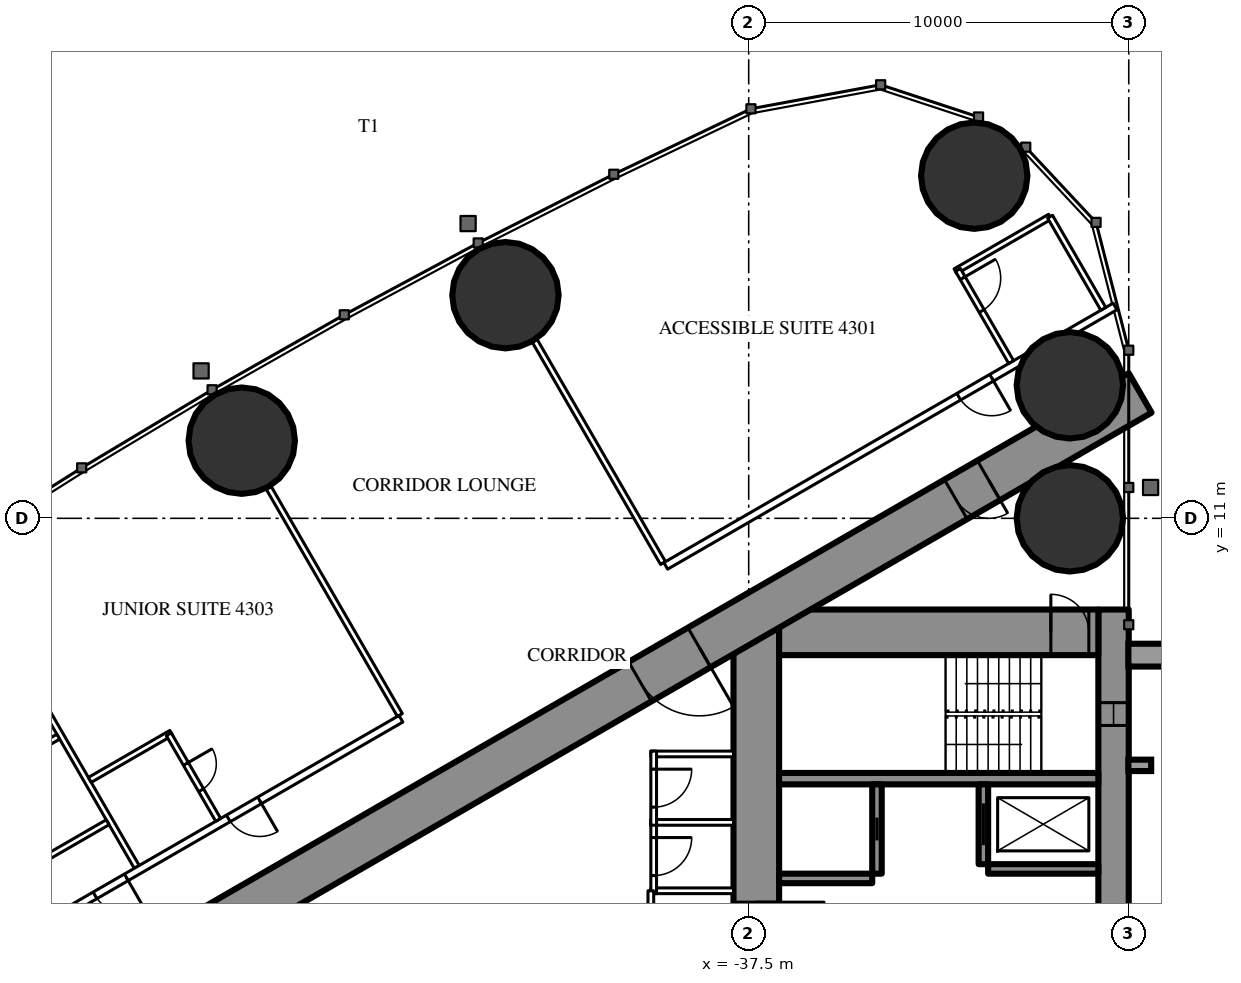
"""IFC4 building model, lengths in metres.
Left out: names, types, materials, properties, quantities, classifications, styles, units other than length and angle.
Written with IfcOpenShell. Run it as: python <this file> out.ifc"""

import sys

from ifc_helpers import new_model, si_unit, direction, frame, frame_2d, origin, origin_2d, place, context, subcontext, project, spatial, rectangle, circle, extrude, element, fill, save


model = new_model("IFC4")
c1 = context("Model", 3, precision=1e-05, world=origin(), true_north=direction((0.0, 1.0)))
c2 = subcontext(c1, "Body", "Model", "MODEL_VIEW")
j1 = project(units=[si_unit("LENGTHUNIT", "METRE"), si_unit("PLANEANGLEUNIT", "RADIAN")], contexts=[c1])
p1 = place(None, origin())
s1 = spatial("IfcSite", under=j1, at=p1, CompositionType="ELEMENT")
p2 = place(p1, origin())
s2 = spatial("IfcBuilding", under=s1, at=p2, CompositionType="ELEMENT")
p3 = place(p2, frame((0.0, 0.0, 163.3)))
s3 = spatial("IfcBuildingStorey", under=s2, at=p3, CompositionType="ELEMENT", Elevation=163.3)
for number, where, z_axis, x_axis in (
    (1, (-31.565, 20.016, 0.0), (0.0, 0.0, 1.0), (1.0, 0.0, 0.0)),
    (2, (-29.05, 11.0, 0.0), (0.0, 0.0, 1.0), (1.0, 0.0, 0.0)),
    (3, (-29.05, 14.5, 0.0), (0.0, 0.0, 1.0), (1.0, 0.0, 0.0)),
    (4, (-43.9, 16.871, 0.0), (0.0, 0.0, 1.0), (1.0, 0.0, 0.0)),
    (5, (-50.839, 13.043, 0.0), (0.0, 0.0, 1.0), (1.0, 0.0, 0.0)),
):
    element("IfcColumn", number, at=place(p3, frame(where, z_axis=z_axis, x_axis=x_axis)), inside=s3, PredefinedType="COLUMN", context=c2, shape_type="SweptSolid", body=[
        extrude(circle(Radius=1.4, at=origin_2d()), origin(), (0.0, 0.0, 1.0), 3.5),
    ])
p4 = place(p3, frame((-27.9, 8.6, 0.0), z_axis=(0.0, 0.0, 1.0), x_axis=(0.0, -1.0, 0.0)))
e6 = element("IfcWall", 6, at=p4, inside=s3, PredefinedType="SHEAR", context=c2, shape_type="SweptSolid", body=[
    extrude(rectangle(XDim=17.2, YDim=0.8, at=frame_2d((8.6, 0.0))), origin(), (0.0, 0.0, 1.0), 3.5),
])
p5 = place(p4, frame((2.45, 0.0, 0.6)))
e7 = element("IfcOpeningElement", 7, at=p5, cuts=e6, PredefinedType="OPENING", context=c2, shape_type="SweptSolid", body=[
    extrude(rectangle(XDim=0.6, YDim=2.1, at=frame_2d((0.3, 1.05))), frame((0.0, 0.41, 0.0), z_axis=(0.0, -1.0, 0.0), x_axis=(1.0, 0.0, 0.0)), (0.0, 0.0, 1.0), 0.82),
])
p6 = place(p4, frame((14.15, 0.0, 0.6)))
e8 = element("IfcOpeningElement", 8, at=p6, cuts=e6, PredefinedType="OPENING", context=c2, shape_type="SweptSolid", body=[
    extrude(rectangle(XDim=0.6, YDim=2.1, at=frame_2d((0.3, 1.05))), frame((0.0, 0.41, 0.0), z_axis=(0.0, -1.0, 0.0), x_axis=(1.0, 0.0, 0.0)), (0.0, 0.0, 1.0), 0.82),
])
p7 = place(p3, frame((-37.3, 8.6, 0.0), z_axis=(0.0, 0.0, 1.0), x_axis=(0.0, -1.0, 0.0)))
e9 = element("IfcWall", 9, at=p7, inside=s3, PredefinedType="SHEAR", context=c2, shape_type="SweptSolid", body=[
    extrude(rectangle(XDim=17.2, YDim=1.2, at=frame_2d((8.6, 0.0))), origin(), (0.0, 0.0, 1.0), 3.5),
])
p8 = place(p7, frame((7.7, 0.0, 0.0)))
e10 = element("IfcOpeningElement", 10, at=p8, cuts=e9, PredefinedType="OPENING", context=c2, shape_type="SweptSolid", body=[
    extrude(rectangle(XDim=1.8, YDim=2.2, at=frame_2d((0.9, 1.1))), frame((0.0, 0.61, 0.0), z_axis=(0.0, -1.0, 0.0), x_axis=(1.0, 0.0, 0.0)), (0.0, 0.0, 1.0), 1.22),
])
p9 = place(p3, frame((-28.3, 8.0, 0.0), z_axis=(0.0, 0.0, 1.0), x_axis=(-1.0, 0.0, 0.0)))
e11 = element("IfcWall", 11, at=p9, inside=s3, PredefinedType="SHEAR", context=c2, shape_type="SweptSolid", body=[
    extrude(rectangle(XDim=8.4, YDim=1.2, at=frame_2d((4.2, 0.0))), origin(), (0.0, 0.0, 1.0), 3.5),
])
p10 = place(p9, frame((0.25, 0.0, 0.0)))
e12 = element("IfcOpeningElement", 12, at=p10, cuts=e11, PredefinedType="OPENING", context=c2, shape_type="SweptSolid", body=[
    extrude(rectangle(XDim=1.0, YDim=2.2, at=frame_2d((0.5, 1.1))), frame((0.0, 0.61, 0.0), z_axis=(0.0, -1.0, 0.0), x_axis=(1.0, 0.0, 0.0)), (0.0, 0.0, 1.0), 1.22),
])
p11 = place(p3, frame((-28.3, 4.15, 0.0), z_axis=(0.0, 0.0, 1.0), x_axis=(-1.0, 0.0, 0.0)))
e13 = element("IfcWall", 13, at=p11, inside=s3, PredefinedType="SHEAR", context=c2, shape_type="SweptSolid", body=[
    extrude(rectangle(XDim=8.4, YDim=0.3, at=frame_2d((4.2, 0.0))), origin(), (0.0, 0.0, 1.0), 3.5),
])
p12 = place(p3, frame((-31.325, 4.0, 0.0), z_axis=(0.0, 0.0, 1.0), x_axis=(0.0, -1.0, 0.0)))
e14 = element("IfcWall", 14, at=p12, inside=s3, PredefinedType="SHEAR", context=c2, shape_type="SweptSolid", body=[
    extrude(rectangle(XDim=2.1, YDim=0.25, at=frame_2d((1.05, 0.0))), origin(), (0.0, 0.0, 1.0), 3.5),
])
p13 = place(p12, frame((0.5, 0.0, 0.0)))
e15 = element("IfcOpeningElement", 15, at=p13, cuts=e14, PredefinedType="OPENING", context=c2, shape_type="SweptSolid", body=[
    extrude(rectangle(XDim=1.1, YDim=2.2, at=frame_2d((0.55, 1.1))), frame((0.0, 0.135, 0.0), z_axis=(0.0, -1.0, 0.0), x_axis=(1.0, 0.0, 0.0)), (0.0, 0.0, 1.0), 0.27),
])
p14 = place(p3, frame((-34.125, 4.0, 0.0), z_axis=(0.0, 0.0, 1.0), x_axis=(0.0, -1.0, 0.0)))
e16 = element("IfcWall", 16, at=p14, inside=s3, PredefinedType="SHEAR", context=c2, shape_type="SweptSolid", body=[
    extrude(rectangle(XDim=2.35, YDim=0.25, at=frame_2d((1.175, 0.0))), origin(), (0.0, 0.0, 1.0), 3.5),
])
p15 = place(p14, frame((0.875, 0.0, 0.0)))
e17 = element("IfcOpeningElement", 17, at=p15, cuts=e16, PredefinedType="OPENING", context=c2, shape_type="SweptSolid", body=[
    extrude(rectangle(XDim=0.6, YDim=2.0, at=frame_2d((0.3, 1.0))), frame((0.0, 0.135, 0.0), z_axis=(0.0, -1.0, 0.0), x_axis=(1.0, 0.0, 0.0)), (0.0, 0.0, 1.0), 0.27),
])
p16 = place(p3, frame((-28.3, 1.775, 0.0), z_axis=(0.0, 0.0, 1.0), x_axis=(-1.0, 0.0, 0.0)))
e18 = element("IfcWall", 18, at=p16, inside=s3, PredefinedType="SHEAR", context=c2, shape_type="SweptSolid", body=[
    extrude(rectangle(XDim=2.9, YDim=0.25, at=frame_2d((1.45, 0.0))), origin(), (0.0, 0.0, 1.0), 3.5),
])
p17 = place(p3, frame((-34.25, 1.525, 0.0), z_axis=(0.0, 0.0, 1.0), x_axis=(-1.0, 0.0, 0.0)))
e19 = element("IfcWall", 19, at=p17, inside=s3, PredefinedType="SHEAR", context=c2, shape_type="SweptSolid", body=[
    extrude(rectangle(XDim=2.45, YDim=0.25, at=frame_2d((1.225, 0.0))), origin(), (0.0, 0.0, 1.0), 3.5),
])
p18 = place(p3, frame((-27.2, 14.3, 0.0), z_axis=(0.0, 0.0, 1.0), x_axis=(-0.866026593062, -0.499997940104, 0.0)))
e20 = element("IfcWall", 20, at=p18, inside=s3, PredefinedType="SHEAR", context=c2, shape_type="SweptSolid", body=[
    extrude(rectangle(XDim=28.946, YDim=1.2, at=frame_2d((14.473, 0.0))), origin(), (0.0, 0.0, 1.0), 3.5),
])
p19 = place(p18, frame((4.6, 0.0, 0.0)))
e21 = element("IfcOpeningElement", 21, at=p19, cuts=e20, PredefinedType="OPENING", context=c2, shape_type="SweptSolid", body=[
    extrude(rectangle(XDim=1.0, YDim=2.2, at=frame_2d((0.5, 1.1))), frame((0.0, 0.61, 0.0), z_axis=(0.0, -1.0, 0.0), x_axis=(1.0, 0.0, 0.0)), (0.0, 0.0, 1.0), 1.22),
])
p20 = place(p18, frame((13.395, 0.0, 0.0)))
e22 = element("IfcOpeningElement", 22, at=p20, cuts=e20, PredefinedType="OPENING", context=c2, shape_type="SweptSolid", body=[
    extrude(rectangle(XDim=1.8, YDim=2.2, at=frame_2d((0.9, 1.1))), frame((0.0, 0.61, 0.0), z_axis=(0.0, -1.0, 0.0), x_axis=(1.0, 0.0, 0.0)), (0.0, 0.0, 1.0), 1.22),
])
p21 = place(p3, frame((-39.754, 9.823, 0.0), z_axis=(0.0, 0.0, 1.0), x_axis=(-0.499997670926, 0.866026748472, 0.0)))
e23 = element("IfcWall", 23, at=p21, inside=s3, PredefinedType="PARTITIONING", context=c2, shape_type="SweptSolid", body=[
    extrude(rectangle(XDim=6.757, YDim=0.15, at=frame_2d((3.379, 0.0))), origin(), (0.0, 0.0, 1.0), 2.3),
])
p22 = place(p3, frame((-46.679, 5.825, 0.0), z_axis=(0.0, 0.0, 1.0), x_axis=(-0.500006839597, 0.866021454905, 0.0)))
e24 = element("IfcWall", 24, at=p22, inside=s3, PredefinedType="PARTITIONING", context=c2, shape_type="SweptSolid", body=[
    extrude(rectangle(XDim=6.911, YDim=0.15, at=frame_2d((3.456, 0.0))), origin(), (0.0, 0.0, 1.0), 2.3),
])
p23 = place(p3, frame((-53.602, 1.828, 0.0), z_axis=(0.0, 0.0, 1.0), x_axis=(-0.49999191814, 0.866030069798, 0.0)))
e25 = element("IfcWall", 25, at=p23, inside=s3, PredefinedType="PARTITIONING", context=c2, shape_type="SweptSolid", body=[
    extrude(rectangle(XDim=6.692, YDim=0.15, at=frame_2d((3.346, 0.0))), origin(), (0.0, 0.0, 1.0), 2.3),
])
p24 = place(p3, frame((-27.86, 16.575, 0.0), z_axis=(0.0, 0.0, 1.0), x_axis=(-0.866026850238, -0.499997494661, 0.0)))
e26 = element("IfcWall", 26, at=p24, inside=s3, PredefinedType="PARTITIONING", context=c2, shape_type="SweptSolid", body=[
    extrude(rectangle(XDim=13.651, YDim=0.2, at=frame_2d((6.826, 0.0))), origin(), (0.0, 0.0, 1.0), 3.25),
])
p25 = place(p24, frame((3.75, 0.0, 0.0)))
e27 = element("IfcOpeningElement", 27, at=p25, cuts=e26, PredefinedType="OPENING", context=c2, shape_type="SweptSolid", body=[
    extrude(rectangle(XDim=1.0, YDim=2.2, at=frame_2d((0.5, 1.1))), frame((0.0, 0.11, 0.0), z_axis=(0.0, -1.0, 0.0), x_axis=(1.0, 0.0, 0.0)), (0.0, 0.0, 1.0), 0.22),
])
p26 = place(p3, frame((-46.65, 5.726, 0.0), z_axis=(0.0, 0.0, 1.0), x_axis=(-0.866027963864, -0.499995565786, 0.0)))
e28 = element("IfcWall", 28, at=p26, inside=s3, PredefinedType="PARTITIONING", context=c2, shape_type="SweptSolid", body=[
    extrude(rectangle(XDim=11.452, YDim=0.2, at=frame_2d((5.726, 0.0))), origin(), (0.0, 0.0, 1.0), 3.25),
])
p27 = place(p26, frame((4.294, 0.0, 0.0)))
e29 = element("IfcOpeningElement", 29, at=p27, cuts=e28, PredefinedType="OPENING", context=c2, shape_type="SweptSolid", body=[
    extrude(rectangle(XDim=0.95, YDim=2.2, at=frame_2d((0.475, 1.1))), frame((0.0, 0.11, 0.0), z_axis=(0.0, -1.0, 0.0), x_axis=(1.0, 0.0, 0.0)), (0.0, 0.0, 1.0), 0.22),
])
p28 = place(p26, frame((8.344, 0.0, 0.0)))
e30 = element("IfcOpeningElement", 30, at=p28, cuts=e28, PredefinedType="OPENING", context=c2, shape_type="SweptSolid", body=[
    extrude(rectangle(XDim=0.95, YDim=2.2, at=frame_2d((0.475, 1.1))), frame((0.0, 0.11, 0.0), z_axis=(0.0, -1.0, 0.0), x_axis=(1.0, 0.0, 0.0)), (0.0, 0.0, 1.0), 0.22),
])
p29 = place(p3, frame((-29.57, 18.936, 0.0), z_axis=(0.0, 0.0, 1.0), x_axis=(-0.866018712932, -0.500011588718, 0.0)))
e31 = element("IfcWall", 31, at=p29, inside=s3, PredefinedType="PARTITIONING", context=c2, shape_type="SweptSolid", body=[
    extrude(rectangle(XDim=2.875, YDim=0.15, at=frame_2d((1.438, 0.0))), origin(), (0.0, 0.0, 1.0), 3.25),
])
p30 = place(p3, frame((-30.595, 15.111, 0.0), z_axis=(0.0, 0.0, 1.0), x_axis=(-0.49998411664, 0.866034573852, 0.0)))
e32 = element("IfcWall", 32, at=p30, inside=s3, PredefinedType="PARTITIONING", context=c2, shape_type="SweptSolid", body=[
    extrude(rectangle(XDim=2.8, YDim=0.15, at=frame_2d((1.4, 0.0))), origin(), (0.0, 0.0, 1.0), 3.25),
])
p31 = place(p30, frame((1.55, 0.0, 0.0)))
e33 = element("IfcOpeningElement", 33, at=p31, cuts=e32, PredefinedType="OPENING", context=c2, shape_type="SweptSolid", body=[
    extrude(rectangle(XDim=1.0, YDim=2.2, at=frame_2d((0.5, 1.1))), frame((0.0, 0.085, 0.0), z_axis=(0.0, -1.0, 0.0), x_axis=(1.0, 0.0, 0.0)), (0.0, 0.0, 1.0), 0.17),
])
p32 = place(p3, frame((-28.17, 16.511, 0.0), z_axis=(0.0, 0.0, 1.0), x_axis=(-0.49994636267, 0.866056369097, 0.0)))
e34 = element("IfcWall", 34, at=p32, inside=s3, PredefinedType="PARTITIONING", context=c2, shape_type="SweptSolid", body=[
    extrude(rectangle(XDim=2.8, YDim=0.15, at=frame_2d((1.4, 0.0))), origin(), (0.0, 0.0, 1.0), 3.25),
])
p33 = place(p3, frame((-52.694, 5.355, 0.0), z_axis=(0.0, 0.0, 1.0), x_axis=(-0.866031185235, -0.4999899861, 0.0)))
e35 = element("IfcWall", 35, at=p33, inside=s3, PredefinedType="PARTITIONING", context=c2, shape_type="SweptSolid", body=[
    extrude(rectangle(XDim=2.475, YDim=0.15, at=frame_2d((1.238, 0.0))), origin(), (0.0, 0.0, 1.0), 3.25),
])
p34 = place(p3, frame((-51.459, 3.065, 0.0), z_axis=(0.0, 0.0, 1.0), x_axis=(-0.499936506574, 0.866062058628, 0.0)))
e36 = element("IfcWall", 36, at=p34, inside=s3, PredefinedType="PARTITIONING", context=c2, shape_type="SweptSolid", body=[
    extrude(rectangle(XDim=2.6, YDim=0.15, at=frame_2d((1.3, 0.0))), origin(), (0.0, 0.0, 1.0), 3.25),
])
p35 = place(p34, frame((0.9, 0.0, 0.0)))
e37 = element("IfcOpeningElement", 37, at=p35, cuts=e36, PredefinedType="OPENING", context=c2, shape_type="SweptSolid", body=[
    extrude(rectangle(XDim=0.8, YDim=2.2, at=frame_2d((0.4, 1.1))), frame((0.0, 0.085, 0.0), z_axis=(0.0, -1.0, 0.0), x_axis=(1.0, 0.0, 0.0)), (0.0, 0.0, 1.0), 0.17),
])
p36 = place(p3, frame((-55.667, 5.255, 0.0), z_axis=(0.0, 0.0, 1.0), x_axis=(-0.866006523861, -0.500032699561, 0.0)))
e38 = element("IfcWall", 38, at=p36, inside=s3, PredefinedType="PARTITIONING", context=c2, shape_type="SweptSolid", body=[
    extrude(rectangle(XDim=2.475, YDim=0.15, at=frame_2d((1.237, 0.0))), origin(), (0.0, 0.0, 1.0), 3.25),
])
p37 = place(p3, frame((-54.367, 3.003, 0.0), z_axis=(0.0, 0.0, 1.0), x_axis=(-0.866031185235, -0.4999899861, 0.0)))
e39 = element("IfcWall", 39, at=p37, inside=s3, PredefinedType="PARTITIONING", context=c2, shape_type="SweptSolid", body=[
    extrude(rectangle(XDim=2.475, YDim=0.15, at=frame_2d((1.238, 0.0))), origin(), (0.0, 0.0, 1.0), 3.25),
])
for number, where, z_axis, x_axis in (
    (40, (-37.9, 1.2, 0.0), (0.0, 0.0, 1.0), (-1.0, 0.0, 0.0)),
    (41, (-37.9, 3.0, 0.0), (0.0, 0.0, 1.0), (-1.0, 0.0, 0.0)),
    (42, (-37.9, 4.8, 0.0), (0.0, 0.0, 1.0), (-1.0, 0.0, 0.0)),
):
    element("IfcWall", number, at=place(p3, frame(where, z_axis=z_axis, x_axis=x_axis)), inside=s3, PredefinedType="PARTITIONING", context=c2, shape_type="SweptSolid", body=[
        extrude(rectangle(XDim=2.175, YDim=0.15, at=frame_2d((1.087, 0.0))), origin(), (0.0, 0.0, 1.0), 3.25),
    ])
p38 = place(p3, frame((-40.0, 3.075, 0.0), z_axis=(0.0, 0.0, 1.0), x_axis=(0.0, -1.0, 0.0)))
e43 = element("IfcWall", 43, at=p38, inside=s3, PredefinedType="PARTITIONING", context=c2, shape_type="SweptSolid", body=[
    extrude(rectangle(XDim=1.95, YDim=0.15, at=frame_2d((0.975, 0.0))), origin(), (0.0, 0.0, 1.0), 3.25),
])
p39 = place(p38, frame((0.475, 0.0, 0.0)))
e44 = element("IfcOpeningElement", 44, at=p39, cuts=e43, PredefinedType="OPENING", context=c2, shape_type="SweptSolid", body=[
    extrude(rectangle(XDim=1.0, YDim=2.2, at=frame_2d((0.5, 1.1))), frame((0.0, 0.085, 0.0), z_axis=(0.0, -1.0, 0.0), x_axis=(1.0, 0.0, 0.0)), (0.0, 0.0, 1.0), 0.17),
])
p40 = place(p3, frame((-40.0, 4.875, 0.0), z_axis=(0.0, 0.0, 1.0), x_axis=(0.0, -1.0, 0.0)))
e45 = element("IfcWall", 45, at=p40, inside=s3, PredefinedType="PARTITIONING", context=c2, shape_type="SweptSolid", body=[
    extrude(rectangle(XDim=1.95, YDim=0.15, at=frame_2d((0.975, 0.0))), origin(), (0.0, 0.0, 1.0), 3.25),
])
p41 = place(p40, frame((0.475, 0.0, 0.0)))
e46 = element("IfcOpeningElement", 46, at=p41, cuts=e45, PredefinedType="OPENING", context=c2, shape_type="SweptSolid", body=[
    extrude(rectangle(XDim=1.0, YDim=2.2, at=frame_2d((0.5, 1.1))), frame((0.0, 0.085, 0.0), z_axis=(0.0, -1.0, 0.0), x_axis=(1.0, 0.0, 0.0)), (0.0, 0.0, 1.0), 0.17),
])
p42 = place(p3, frame((-40.075, 1.2, 0.0), z_axis=(0.0, 0.0, 1.0), x_axis=(0.0, -1.0, 0.0)))
e47 = element("IfcWall", 47, at=p42, inside=s3, PredefinedType="PARTITIONING", context=c2, shape_type="SweptSolid", body=[
    extrude(rectangle(XDim=7.374, YDim=0.15, at=frame_2d((3.687, 0.0))), origin(), (0.0, 0.0, 1.0), 3.25),
])
p43 = place(p42, frame((2.787, 0.0, 0.0)))
e48 = element("IfcOpeningElement", 48, at=p43, cuts=e47, PredefinedType="OPENING", context=c2, shape_type="SweptSolid", body=[
    extrude(rectangle(XDim=1.8, YDim=2.2, at=frame_2d((0.9, 1.1))), frame((0.0, 0.085, 0.0), z_axis=(0.0, -1.0, 0.0), x_axis=(1.0, 0.0, 0.0)), (0.0, 0.0, 1.0), 0.17),
])
p44 = place(p31, origin())
e49 = element("IfcDoor", 49, at=p44, inside=s3, OperationType="SINGLE_SWING_RIGHT", PredefinedType="DOOR", context=c2, shape_type="SweptSolid", body=[
    extrude(rectangle(XDim=1.0, YDim=2.2, at=frame_2d((0.5, 1.1))), frame((0.0, 0.025, 0.0), z_axis=(0.0, -1.0, 0.0), x_axis=(1.0, 0.0, 0.0)), (0.0, 0.0, 1.0), 0.05),
])
fill(e33, e49)
p45 = place(p25, origin())
e50 = element("IfcDoor", 50, at=p45, inside=s3, OperationType="SINGLE_SWING_LEFT", PredefinedType="DOOR", context=c2, shape_type="SweptSolid", body=[
    extrude(rectangle(XDim=1.0, YDim=2.2, at=frame_2d((0.5, 1.1))), frame((0.0, 0.025, 0.0), z_axis=(0.0, -1.0, 0.0), x_axis=(1.0, 0.0, 0.0)), (0.0, 0.0, 1.0), 0.05),
])
fill(e27, e50)
p46 = place(p35, origin())
e51 = element("IfcDoor", 51, at=p46, inside=s3, OperationType="SINGLE_SWING_RIGHT", PredefinedType="DOOR", context=c2, shape_type="SweptSolid", body=[
    extrude(rectangle(XDim=0.8, YDim=2.2, at=frame_2d((0.4, 1.1))), frame((0.0, 0.025, 0.0), z_axis=(0.0, -1.0, 0.0), x_axis=(1.0, 0.0, 0.0)), (0.0, 0.0, 1.0), 0.05),
])
fill(e37, e51)
p47 = place(p27, origin())
e52 = element("IfcDoor", 52, at=p47, inside=s3, OperationType="SINGLE_SWING_LEFT", PredefinedType="DOOR", context=c2, shape_type="SweptSolid", body=[
    extrude(rectangle(XDim=0.95, YDim=2.2, at=frame_2d((0.475, 1.1))), frame((0.0, 0.025, 0.0), z_axis=(0.0, -1.0, 0.0), x_axis=(1.0, 0.0, 0.0)), (0.0, 0.0, 1.0), 0.05),
])
fill(e29, e52)
p48 = place(p28, origin())
e53 = element("IfcDoor", 53, at=p48, inside=s3, OperationType="SINGLE_SWING_LEFT", PredefinedType="DOOR", context=c2, shape_type="SweptSolid", body=[
    extrude(rectangle(XDim=0.95, YDim=2.2, at=frame_2d((0.475, 1.1))), frame((0.0, 0.025, 0.0), z_axis=(0.0, -1.0, 0.0), x_axis=(1.0, 0.0, 0.0)), (0.0, 0.0, 1.0), 0.05),
])
fill(e30, e53)
p49 = place(p39, origin())
e54 = element("IfcDoor", 54, at=p49, inside=s3, OperationType="SINGLE_SWING_LEFT", PredefinedType="DOOR", context=c2, shape_type="SweptSolid", body=[
    extrude(rectangle(XDim=1.0, YDim=2.2, at=frame_2d((0.5, 1.1))), frame((0.0, 0.025, 0.0), z_axis=(0.0, -1.0, 0.0), x_axis=(1.0, 0.0, 0.0)), (0.0, 0.0, 1.0), 0.05),
])
fill(e44, e54)
p50 = place(p41, origin())
e55 = element("IfcDoor", 55, at=p50, inside=s3, OperationType="SINGLE_SWING_LEFT", PredefinedType="DOOR", context=c2, shape_type="SweptSolid", body=[
    extrude(rectangle(XDim=1.0, YDim=2.2, at=frame_2d((0.5, 1.1))), frame((0.0, 0.025, 0.0), z_axis=(0.0, -1.0, 0.0), x_axis=(1.0, 0.0, 0.0)), (0.0, 0.0, 1.0), 0.05),
])
fill(e46, e55)
p51 = place(p19, origin())
e56 = element("IfcDoor", 56, at=p51, inside=s3, OperationType="SINGLE_SWING_LEFT", PredefinedType="DOOR", context=c2, shape_type="SweptSolid", body=[
    extrude(rectangle(XDim=1.0, YDim=2.2, at=frame_2d((0.5, 1.1))), frame((0.0, 0.025, 0.0), z_axis=(0.0, -1.0, 0.0), x_axis=(1.0, 0.0, 0.0)), (0.0, 0.0, 1.0), 0.05),
])
fill(e21, e56)
p52 = place(p20, origin())
e57 = element("IfcDoor", 57, at=p52, inside=s3, OperationType="DOUBLE_DOOR_SINGLE_SWING", PredefinedType="DOOR", context=c2, shape_type="SweptSolid", body=[
    extrude(rectangle(XDim=1.8, YDim=2.2, at=frame_2d((0.9, 1.1))), frame((0.0, 0.025, 0.0), z_axis=(0.0, -1.0, 0.0), x_axis=(1.0, 0.0, 0.0)), (0.0, 0.0, 1.0), 0.05),
])
fill(e22, e57)
p53 = place(p8, origin())
e58 = element("IfcDoor", 58, at=p53, inside=s3, OperationType="DOUBLE_DOOR_SINGLE_SWING", PredefinedType="DOOR", context=c2, shape_type="SweptSolid", body=[
    extrude(rectangle(XDim=1.8, YDim=2.2, at=frame_2d((0.9, 1.1))), frame((0.0, 0.025, 0.0), z_axis=(0.0, -1.0, 0.0), x_axis=(1.0, 0.0, 0.0)), (0.0, 0.0, 1.0), 0.05),
])
fill(e10, e58)
p54 = place(p10, origin())
e59 = element("IfcDoor", 59, at=p54, inside=s3, OperationType="SINGLE_SWING_RIGHT", PredefinedType="DOOR", context=c2, shape_type="SweptSolid", body=[
    extrude(rectangle(XDim=1.0, YDim=2.2, at=frame_2d((0.5, 1.1))), frame((0.0, 0.025, 0.0), z_axis=(0.0, -1.0, 0.0), x_axis=(1.0, 0.0, 0.0)), (0.0, 0.0, 1.0), 0.05),
])
fill(e12, e59)
p55 = place(p13, origin())
e60 = element("IfcDoor", 60, at=p55, inside=s3, OperationType="SLIDING_TO_LEFT", PredefinedType="USERDEFINED", context=c2, shape_type="SweptSolid", body=[
    extrude(rectangle(XDim=1.1, YDim=2.2, at=frame_2d((0.55, 1.1))), frame((0.0, 0.025, 0.0), z_axis=(0.0, -1.0, 0.0), x_axis=(1.0, 0.0, 0.0)), (0.0, 0.0, 1.0), 0.05),
])
fill(e15, e60)
p56 = place(p15, origin())
e61 = element("IfcDoor", 61, at=p56, inside=s3, OperationType="SLIDING_TO_LEFT", PredefinedType="DOOR", context=c2, shape_type="SweptSolid", body=[
    extrude(rectangle(XDim=0.6, YDim=2.0, at=frame_2d((0.3, 1.0))), frame((0.0, 0.025, 0.0), z_axis=(0.0, -1.0, 0.0), x_axis=(1.0, 0.0, 0.0)), (0.0, 0.0, 1.0), 0.05),
])
fill(e17, e61)
p57 = place(p5, origin())
e62 = element("IfcWindow", 62, at=p57, inside=s3, PartitioningType="SINGLE_PANEL", PredefinedType="WINDOW", context=c2, shape_type="SweptSolid", body=[
    extrude(rectangle(XDim=0.6, YDim=2.1, at=frame_2d((0.3, 1.05))), frame((0.0, 0.03, 0.0), z_axis=(0.0, -1.0, 0.0), x_axis=(1.0, 0.0, 0.0)), (0.0, 0.0, 1.0), 0.06),
])
fill(e7, e62)
save(model, sys.argv[1])
